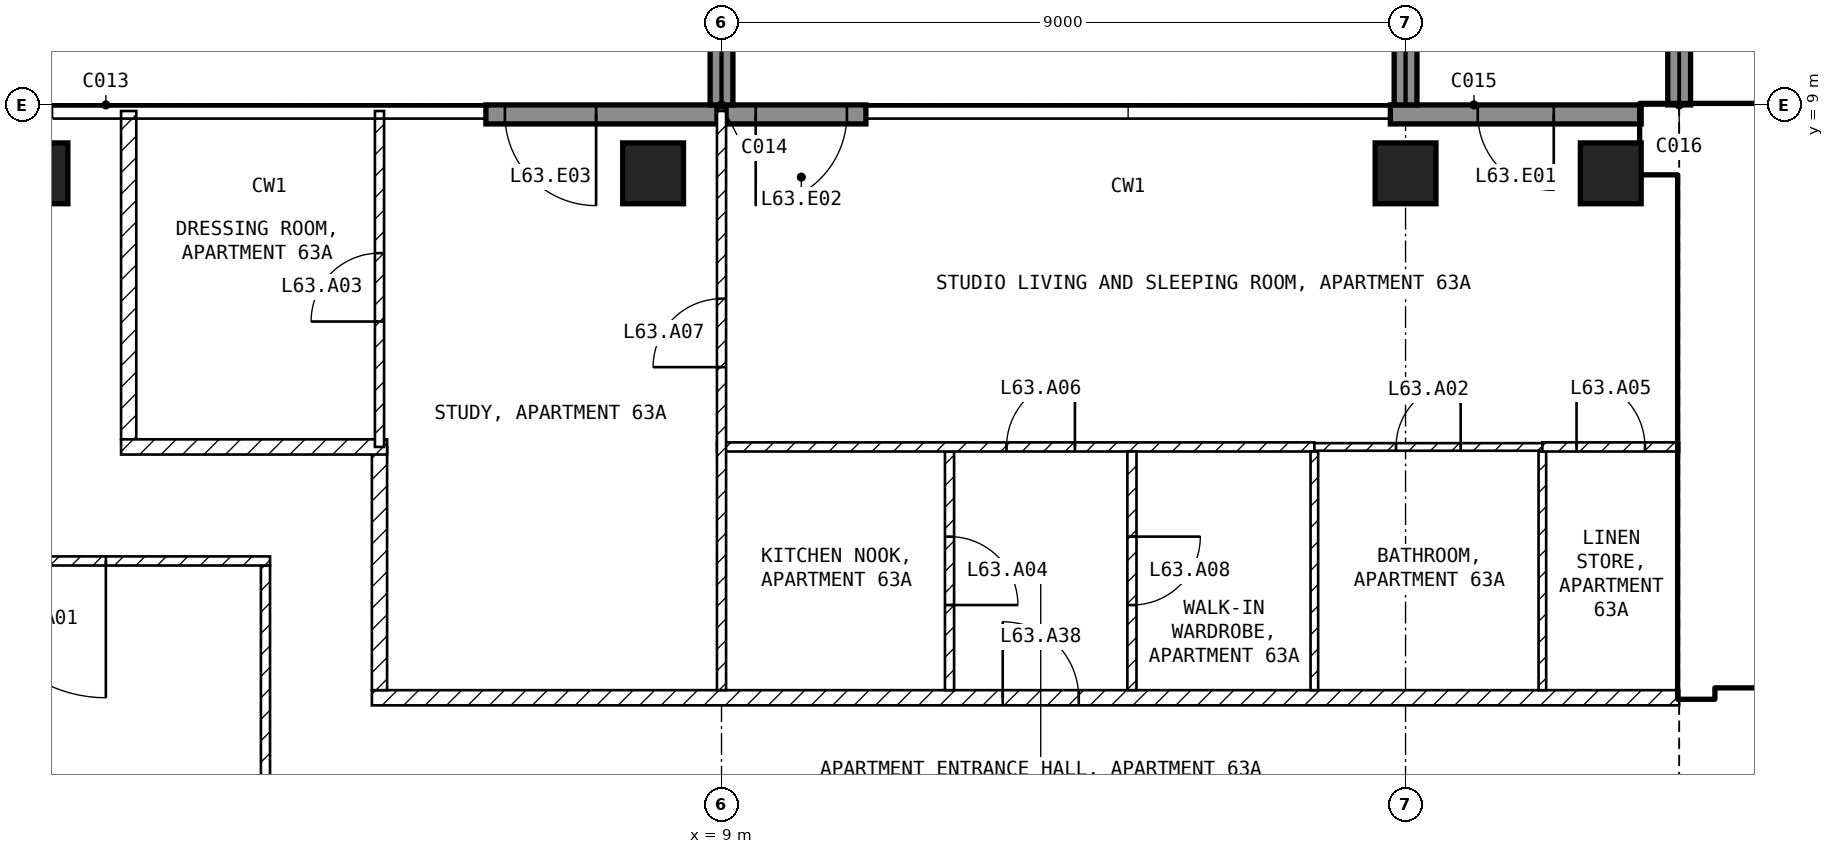
"""IFC4 building model, lengths in metres.
Left out: names, types, materials, properties, quantities, classifications, styles, units other than length and angle.
Written with IfcOpenShell. Run it as: python <this file> out.ifc"""

import sys

from ifc_helpers import new_model, si_unit, direction, frame, frame_2d, origin, origin_2d, place, context, subcontext, project, spatial, rectangle, extrude, element, fill, save


model = new_model("IFC4")
c1 = context("Model", 3, precision=1e-05, world=origin(), true_north=direction((0.0, 1.0)))
c2 = subcontext(c1, "Body", "Model", "MODEL_VIEW")
j1 = project(units=[si_unit("LENGTHUNIT", "METRE"), si_unit("PLANEANGLEUNIT", "RADIAN")], contexts=[c1])
p1 = place(None, origin())
s1 = spatial("IfcSite", under=j1, at=p1, CompositionType="ELEMENT")
p2 = place(p1, origin())
s2 = spatial("IfcBuilding", under=s1, at=p2, CompositionType="ELEMENT")
p3 = place(p2, frame((0.0, 0.0, 250.0)))
s3 = spatial("IfcBuildingStorey", under=s2, at=p3, CompositionType="ELEMENT", Elevation=250.0)
for number, where, z_axis, x_axis in (
    (1, (0.0, 8.1, -0.25), (0.0, 0.0, 1.0), (1.0, 0.0, 0.0)),
    (2, (8.1, 8.1, -0.25), (0.0, 0.0, 1.0), (1.0, 0.0, 0.0)),
    (3, (18.0, 8.1, -0.25), (0.0, 0.0, 1.0), (1.0, 0.0, 0.0)),
    (4, (20.7, 8.1, -0.25), (0.0, 0.0, 1.0), (1.0, 0.0, 0.0)),
):
    element("IfcColumn", number, at=place(p3, frame(where, z_axis=z_axis, x_axis=x_axis)), inside=s3, PredefinedType="COLUMN", context=c2, shape_type="SweptSolid", body=[
        extrude(rectangle(XDim=0.8, YDim=0.8, at=origin_2d()), origin(), (0.0, 0.0, 1.0), 3.5),
    ])
p4 = place(p3, frame((21.1, 8.875, 0.0), z_axis=(0.0, 0.0, 1.0), x_axis=(-1.0, 0.0, 0.0)))
e5 = element("IfcWall", 5, at=p4, inside=s3, PredefinedType="SOLIDWALL", context=c2, shape_type="SweptSolid", body=[
    extrude(rectangle(XDim=3.3, YDim=0.25, at=frame_2d((1.65, 0.0))), origin(), (0.0, 0.0, 1.0), 3.25),
])
p5 = place(p4, frame((1.15, 0.0, 0.0)))
e6 = element("IfcOpeningElement", 6, at=p5, cuts=e5, PredefinedType="OPENING", context=c2, shape_type="SweptSolid", body=[
    extrude(rectangle(XDim=1.0, YDim=2.4, at=frame_2d((0.5, 1.2))), frame((0.0, 0.135, 0.0), z_axis=(0.0, -1.0, 0.0), x_axis=(1.0, 0.0, 0.0)), (0.0, 0.0, 1.0), 0.27),
])
p6 = place(p3, frame((10.9, 8.875, 0.0), z_axis=(0.0, 0.0, 1.0), x_axis=(-1.0, 0.0, 0.0)))
e7 = element("IfcWall", 7, at=p6, inside=s3, PredefinedType="SOLIDWALL", context=c2, shape_type="SweptSolid", body=[
    extrude(rectangle(XDim=1.84, YDim=0.25, at=frame_2d((0.92, 0.0))), origin(), (0.0, 0.0, 1.0), 3.25),
])
p7 = place(p6, frame((0.25, 0.0, 0.0)))
e8 = element("IfcOpeningElement", 8, at=p7, cuts=e7, PredefinedType="OPENING", context=c2, shape_type="SweptSolid", body=[
    extrude(rectangle(XDim=1.2, YDim=2.4, at=frame_2d((0.6, 1.2))), frame((0.0, 0.135, 0.0), z_axis=(0.0, -1.0, 0.0), x_axis=(1.0, 0.0, 0.0)), (0.0, 0.0, 1.0), 0.27),
])
p8 = place(p3, frame((8.94, 8.875, 0.0), z_axis=(0.0, 0.0, 1.0), x_axis=(-1.0, 0.0, 0.0)))
e9 = element("IfcWall", 9, at=p8, inside=s3, PredefinedType="SOLIDWALL", context=c2, shape_type="SweptSolid", body=[
    extrude(rectangle(XDim=3.04, YDim=0.25, at=frame_2d((1.52, 0.0))), origin(), (0.0, 0.0, 1.0), 3.25),
])
p9 = place(p8, frame((1.59, 0.0, 0.0)))
e10 = element("IfcOpeningElement", 10, at=p9, cuts=e9, PredefinedType="OPENING", context=c2, shape_type="SweptSolid", body=[
    extrude(rectangle(XDim=1.2, YDim=2.4, at=frame_2d((0.6, 1.2))), frame((0.0, 0.135, 0.0), z_axis=(0.0, -1.0, 0.0), x_axis=(1.0, 0.0, 0.0)), (0.0, 0.0, 1.0), 0.27),
])
for number, where, z_axis, x_axis in (
    (11, (9.0, 9.0, 0.0), (0.0, 0.0, 1.0), (0.0, 1.0, 0.0)),
    (12, (18.0, 9.0, 0.0), (0.0, 0.0, 1.0), (0.0, 1.0, 0.0)),
    (13, (21.6, 9.0, 0.0), (0.0, 0.0, 1.0), (0.0, 1.0, 0.0)),
):
    element("IfcWall", number, at=place(p3, frame(where, z_axis=z_axis, x_axis=x_axis)), inside=s3, PredefinedType="SOLIDWALL", context=c2, shape_type="SweptSolid", body=[
        extrude(rectangle(XDim=2.7, YDim=0.3, at=frame_2d((1.35, 0.0))), origin(), (0.0, 0.0, 1.0), 3.25),
    ])
p10 = place(p3, frame((21.1, 8.55, 0.0), z_axis=(0.0, 0.0, 1.0), x_axis=(1.0, 0.0, 0.0)))
e14 = element("IfcWall", 14, at=p10, inside=s3, PredefinedType="SHEAR", context=c2, shape_type="SweptSolid", body=[
    extrude(rectangle(XDim=8.65, YDim=0.9, at=frame_2d((4.325, 0.0))), origin(), (0.0, 0.0, 1.0), 3.25),
])
p11 = place(p3, frame((21.825, 1.2, 0.0), z_axis=(0.0, 0.0, 1.0), x_axis=(0.0, 1.0, 0.0)))
e15 = element("IfcWall", 15, at=p11, inside=s3, PredefinedType="SHEAR", context=c2, shape_type="SweptSolid", body=[
    extrude(rectangle(XDim=6.9, YDim=0.45, at=frame_2d((3.45, 0.0))), origin(), (0.0, 0.0, 1.0), 3.25),
])
p12 = place(p3, frame((22.05, 1.45, 0.0), z_axis=(0.0, 0.0, 1.0), x_axis=(1.0, 0.0, 0.0)))
e16 = element("IfcWall", 16, at=p12, inside=s3, PredefinedType="SOLIDWALL", context=c2, shape_type="SweptSolid", body=[
    extrude(rectangle(XDim=11.3, YDim=0.2, at=frame_2d((5.65, 0.0))), origin(), (0.0, 0.0, 1.0), 3.25),
])
p13 = place(p12, frame((0.75, 0.0, 0.0)))
e17 = element("IfcOpeningElement", 17, at=p13, cuts=e16, PredefinedType="OPENING", context=c2, shape_type="SweptSolid", body=[
    extrude(rectangle(XDim=1.0, YDim=2.1, at=frame_2d((0.5, 1.05))), frame((0.0, 0.11, 0.0), z_axis=(0.0, -1.0, 0.0), x_axis=(1.0, 0.0, 0.0)), (0.0, 0.0, 1.0), 0.22),
])
p14 = place(p12, frame((3.25, 0.0, 0.0)))
e18 = element("IfcOpeningElement", 18, at=p14, cuts=e16, PredefinedType="OPENING", context=c2, shape_type="SweptSolid", body=[
    extrude(rectangle(XDim=1.0, YDim=2.1, at=frame_2d((0.5, 1.05))), frame((0.0, 0.11, 0.0), z_axis=(0.0, -1.0, 0.0), x_axis=(1.0, 0.0, 0.0)), (0.0, 0.0, 1.0), 0.22),
])
p15 = place(p12, frame((9.225, 0.0, 0.0)))
e19 = element("IfcOpeningElement", 19, at=p15, cuts=e16, PredefinedType="OPENING", context=c2, shape_type="SweptSolid", body=[
    extrude(rectangle(XDim=0.9, YDim=2.1, at=frame_2d((0.45, 1.05))), frame((0.0, 0.11, 0.0), z_axis=(0.0, -1.0, 0.0), x_axis=(1.0, 0.0, 0.0)), (0.0, 0.0, 1.0), 0.22),
])
p16 = place(p3, frame((22.05, 5.15, 0.0), z_axis=(0.0, 0.0, 1.0), x_axis=(1.0, 0.0, 0.0)))
e20 = element("IfcWall", 20, at=p16, inside=s3, PredefinedType="SOLIDWALL", context=c2, shape_type="SweptSolid", body=[
    extrude(rectangle(XDim=6.3, YDim=0.2, at=frame_2d((3.15, 0.0))), origin(), (0.0, 0.0, 1.0), 3.25),
])
p17 = place(p16, frame((0.2, 0.0, 0.0)))
e21 = element("IfcOpeningElement", 21, at=p17, cuts=e20, PredefinedType="OPENING", context=c2, shape_type="SweptSolid", body=[
    extrude(rectangle(XDim=1.0, YDim=2.1, at=frame_2d((0.5, 1.05))), frame((0.0, 0.11, 0.0), z_axis=(0.0, -1.0, 0.0), x_axis=(1.0, 0.0, 0.0)), (0.0, 0.0, 1.0), 0.22),
])
p18 = place(p3, frame((3.0, -2.94, 0.0), z_axis=(0.0, 0.0, 1.0), x_axis=(0.0, 1.0, 0.0)))
e22 = element("IfcWall", 22, at=p18, inside=s3, PredefinedType="PARTITIONING", context=c2, shape_type="SweptSolid", body=[
    extrude(rectangle(XDim=5.88, YDim=0.12, at=frame_2d((2.94, 0.0))), origin(), (0.0, 0.0, 1.0), 3.25),
])
p19 = place(p3, frame((3.06, 3.0, 0.0), z_axis=(0.0, 0.0, 1.0), x_axis=(-1.0, 0.0, 0.0)))
e23 = element("IfcWall", 23, at=p19, inside=s3, PredefinedType="PARTITIONING", context=c2, shape_type="SweptSolid", body=[
    extrude(rectangle(XDim=6.12, YDim=0.12, at=frame_2d((3.06, 0.0))), origin(), (0.0, 0.0, 1.0), 3.25),
])
p20 = place(p19, frame((2.16, 0.0, 0.0)))
e24 = element("IfcOpeningElement", 24, at=p20, cuts=e23, PredefinedType="OPENING", context=c2, shape_type="SweptSolid", body=[
    extrude(rectangle(XDim=1.8, YDim=2.1, at=frame_2d((0.9, 1.05))), frame((0.0, 0.07, 0.0), z_axis=(0.0, -1.0, 0.0), x_axis=(1.0, 0.0, 0.0)), (0.0, 0.0, 1.0), 0.14),
])
p21 = place(p3, frame((4.4, 1.2, 0.0), z_axis=(0.0, 0.0, 1.0), x_axis=(1.0, 0.0, 0.0)))
e25 = element("IfcWall", 25, at=p21, inside=s3, PredefinedType="PARTITIONING", context=c2, shape_type="SweptSolid", body=[
    extrude(rectangle(XDim=17.2, YDim=0.2, at=frame_2d((8.6, 0.0))), origin(), (0.0, 0.0, 1.0), 3.25),
])
p22 = place(p21, frame((8.3, 0.0, 0.0)))
e26 = element("IfcOpeningElement", 26, at=p22, cuts=e25, PredefinedType="OPENING", context=c2, shape_type="SweptSolid", body=[
    extrude(rectangle(XDim=1.0, YDim=2.1, at=frame_2d((0.5, 1.05))), frame((0.0, 0.11, 0.0), z_axis=(0.0, -1.0, 0.0), x_axis=(1.0, 0.0, 0.0)), (0.0, 0.0, 1.0), 0.22),
])
p23 = place(p3, frame((4.5, 4.5, 0.0), z_axis=(0.0, 0.0, 1.0), x_axis=(0.0, -1.0, 0.0)))
e27 = element("IfcWall", 27, at=p23, inside=s3, PredefinedType="PARTITIONING", context=c2, shape_type="SweptSolid", body=[
    extrude(rectangle(XDim=3.2, YDim=0.2, at=frame_2d((1.6, 0.0))), origin(), (0.0, 0.0, 1.0), 3.25),
])
p24 = place(p3, frame((1.2, 8.92, 0.0), z_axis=(0.0, 0.0, 1.0), x_axis=(0.0, -1.0, 0.0)))
e28 = element("IfcWall", 28, at=p24, inside=s3, PredefinedType="PARTITIONING", context=c2, shape_type="SweptSolid", body=[
    extrude(rectangle(XDim=4.32, YDim=0.2, at=frame_2d((2.16, 0.0))), origin(), (0.0, 0.0, 1.0), 3.25),
])
p25 = place(p3, frame((1.1, 4.5, 0.0), z_axis=(0.0, 0.0, 1.0), x_axis=(1.0, 0.0, 0.0)))
e29 = element("IfcWall", 29, at=p25, inside=s3, PredefinedType="PARTITIONING", context=c2, shape_type="SweptSolid", body=[
    extrude(rectangle(XDim=3.5, YDim=0.2, at=frame_2d((1.75, 0.0))), origin(), (0.0, 0.0, 1.0), 3.25),
])
p26 = place(p3, frame((12.0, 4.44, 0.0), z_axis=(0.0, 0.0, 1.0), x_axis=(0.0, -1.0, 0.0)))
e30 = element("IfcWall", 30, at=p26, inside=s3, PredefinedType="PARTITIONING", context=c2, shape_type="SweptSolid", body=[
    extrude(rectangle(XDim=3.14, YDim=0.12, at=frame_2d((1.57, 0.0))), origin(), (0.0, 0.0, 1.0), 3.25),
])
p27 = place(p26, frame((1.12, 0.0, 0.0)))
e31 = element("IfcOpeningElement", 31, at=p27, cuts=e30, PredefinedType="OPENING", context=c2, shape_type="SweptSolid", body=[
    extrude(rectangle(XDim=0.9, YDim=2.1, at=frame_2d((0.45, 1.05))), frame((0.0, 0.07, 0.0), z_axis=(0.0, -1.0, 0.0), x_axis=(1.0, 0.0, 0.0)), (0.0, 0.0, 1.0), 0.14),
])
p28 = place(p3, frame((8.94, 4.5, 0.0), z_axis=(0.0, 0.0, 1.0), x_axis=(1.0, 0.0, 0.0)))
e32 = element("IfcWall", 32, at=p28, inside=s3, PredefinedType="PARTITIONING", context=c2, shape_type="SweptSolid", body=[
    extrude(rectangle(XDim=7.86, YDim=0.12, at=frame_2d((3.93, 0.0))), origin(), (0.0, 0.0, 1.0), 3.25),
])
p29 = place(p28, frame((3.81, 0.0, 0.0)))
e33 = element("IfcOpeningElement", 33, at=p29, cuts=e32, PredefinedType="OPENING", context=c2, shape_type="SweptSolid", body=[
    extrude(rectangle(XDim=0.9, YDim=2.1, at=frame_2d((0.45, 1.05))), frame((0.0, 0.07, 0.0), z_axis=(0.0, -1.0, 0.0), x_axis=(1.0, 0.0, 0.0)), (0.0, 0.0, 1.0), 0.14),
])
p30 = place(p3, frame((9.0, 1.3, 0.0), z_axis=(0.0, 0.0, 1.0), x_axis=(0.0, 1.0, 0.0)))
e34 = element("IfcWall", 34, at=p30, inside=s3, PredefinedType="PARTITIONING", context=c2, shape_type="SweptSolid", body=[
    extrude(rectangle(XDim=7.62, YDim=0.12, at=frame_2d((3.81, 0.0))), origin(), (0.0, 0.0, 1.0), 3.25),
])
p31 = place(p30, frame((4.25, 0.0, 0.0)))
e35 = element("IfcOpeningElement", 35, at=p31, cuts=e34, PredefinedType="OPENING", context=c2, shape_type="SweptSolid", body=[
    extrude(rectangle(XDim=0.9, YDim=2.1, at=frame_2d((0.45, 1.05))), frame((0.0, 0.07, 0.0), z_axis=(0.0, -1.0, 0.0), x_axis=(1.0, 0.0, 0.0)), (0.0, 0.0, 1.0), 0.14),
])
p32 = place(p3, frame((14.4, 4.44, 0.0), z_axis=(0.0, 0.0, 1.0), x_axis=(0.0, -1.0, 0.0)))
e36 = element("IfcWall", 36, at=p32, inside=s3, PredefinedType="PARTITIONING", context=c2, shape_type="SweptSolid", body=[
    extrude(rectangle(XDim=3.14, YDim=0.12, at=frame_2d((1.57, 0.0))), origin(), (0.0, 0.0, 1.0), 3.25),
])
p33 = place(p32, frame((1.12, 0.0, 0.0)))
e37 = element("IfcOpeningElement", 37, at=p33, cuts=e36, PredefinedType="OPENING", context=c2, shape_type="SweptSolid", body=[
    extrude(rectangle(XDim=0.9, YDim=2.1, at=frame_2d((0.45, 1.05))), frame((0.0, 0.07, 0.0), z_axis=(0.0, -1.0, 0.0), x_axis=(1.0, 0.0, 0.0)), (0.0, 0.0, 1.0), 0.14),
])
for number, where, z_axis, x_axis in (
    (38, (16.8, 4.44, 0.0), (0.0, 0.0, 1.0), (0.0, -1.0, 0.0)),
    (39, (19.8, 4.44, 0.0), (0.0, 0.0, 1.0), (0.0, -1.0, 0.0)),
):
    element("IfcWall", number, at=place(p3, frame(where, z_axis=z_axis, x_axis=x_axis)), inside=s3, PredefinedType="PARTITIONING", context=c2, shape_type="SweptSolid", body=[
        extrude(rectangle(XDim=3.14, YDim=0.1, at=frame_2d((1.57, 0.0))), origin(), (0.0, 0.0, 1.0), 3.25),
    ])
p34 = place(p3, frame((16.8, 4.5, 0.0), z_axis=(0.0, 0.0, 1.0), x_axis=(1.0, 0.0, 0.0)))
e40 = element("IfcWall", 40, at=p34, inside=s3, PredefinedType="PARTITIONING", context=c2, shape_type="SweptSolid", body=[
    extrude(rectangle(XDim=3.0, YDim=0.1, at=frame_2d((1.5, 0.0))), origin(), (0.0, 0.0, 1.0), 3.25),
])
p35 = place(p34, frame((1.075, 0.0, 0.0)))
e41 = element("IfcOpeningElement", 41, at=p35, cuts=e40, PredefinedType="OPENING", context=c2, shape_type="SweptSolid", body=[
    extrude(rectangle(XDim=0.85, YDim=2.1, at=frame_2d((0.425, 1.05))), frame((0.0, 0.06, 0.0), z_axis=(0.0, -1.0, 0.0), x_axis=(1.0, 0.0, 0.0)), (0.0, 0.0, 1.0), 0.12),
])
p36 = place(p3, frame((19.8, 4.5, 0.0), z_axis=(0.0, 0.0, 1.0), x_axis=(1.0, 0.0, 0.0)))
e42 = element("IfcWall", 42, at=p36, inside=s3, PredefinedType="PARTITIONING", context=c2, shape_type="SweptSolid", body=[
    extrude(rectangle(XDim=1.8, YDim=0.12, at=frame_2d((0.9, 0.0))), origin(), (0.0, 0.0, 1.0), 3.25),
])
p37 = place(p36, frame((0.45, 0.0, 0.0)))
e43 = element("IfcOpeningElement", 43, at=p37, cuts=e42, PredefinedType="OPENING", context=c2, shape_type="SweptSolid", body=[
    extrude(rectangle(XDim=0.9, YDim=2.1, at=frame_2d((0.45, 1.05))), frame((0.0, 0.07, 0.0), z_axis=(0.0, -1.0, 0.0), x_axis=(1.0, 0.0, 0.0)), (0.0, 0.0, 1.0), 0.14),
])
p38 = place(p3, frame((4.5, 4.5, 0.0), z_axis=(0.0, 0.0, 1.0), x_axis=(0.0, 1.0, 0.0)))
e44 = element("IfcWall", 44, at=p38, inside=s3, PredefinedType="PARTITIONING", context=c2, shape_type="SweptSolid", body=[
    extrude(rectangle(XDim=4.42, YDim=0.12, at=frame_2d((2.21, 0.0))), origin(), (0.0, 0.0, 1.0), 3.25),
])
p39 = place(p38, frame((1.65, 0.0, 0.0)))
e45 = element("IfcOpeningElement", 45, at=p39, cuts=e44, PredefinedType="OPENING", context=c2, shape_type="SweptSolid", body=[
    extrude(rectangle(XDim=0.9, YDim=2.1, at=frame_2d((0.45, 1.05))), frame((0.0, 0.07, 0.0), z_axis=(0.0, -1.0, 0.0), x_axis=(1.0, 0.0, 0.0)), (0.0, 0.0, 1.0), 0.14),
])
p40 = place(p5, origin())
e46 = element("IfcDoor", 46, at=p40, inside=s3, OperationType="SINGLE_SWING_LEFT", PredefinedType="DOOR", context=c2, shape_type="SweptSolid", body=[
    extrude(rectangle(XDim=1.0, YDim=2.4, at=frame_2d((0.5, 1.2))), frame((0.0, 0.025, 0.0), z_axis=(0.0, -1.0, 0.0), x_axis=(1.0, 0.0, 0.0)), (0.0, 0.0, 1.0), 0.05),
])
fill(e6, e46)
p41 = place(p7, origin())
e47 = element("IfcDoor", 47, at=p41, inside=s3, OperationType="SINGLE_SWING_RIGHT", PredefinedType="DOOR", context=c2, shape_type="SweptSolid", body=[
    extrude(rectangle(XDim=1.2, YDim=2.4, at=frame_2d((0.6, 1.2))), frame((0.0, 0.025, 0.0), z_axis=(0.0, -1.0, 0.0), x_axis=(1.0, 0.0, 0.0)), (0.0, 0.0, 1.0), 0.05),
])
fill(e8, e47)
p42 = place(p9, origin())
e48 = element("IfcDoor", 48, at=p42, inside=s3, OperationType="SINGLE_SWING_LEFT", PredefinedType="DOOR", context=c2, shape_type="SweptSolid", body=[
    extrude(rectangle(XDim=1.2, YDim=2.4, at=frame_2d((0.6, 1.2))), frame((0.0, 0.025, 0.0), z_axis=(0.0, -1.0, 0.0), x_axis=(1.0, 0.0, 0.0)), (0.0, 0.0, 1.0), 0.05),
])
fill(e10, e48)
p43 = place(p17, origin())
e49 = element("IfcDoor", 49, at=p43, inside=s3, OperationType="SINGLE_SWING_LEFT", PredefinedType="DOOR", context=c2, shape_type="SweptSolid", body=[
    extrude(rectangle(XDim=1.0, YDim=2.1, at=frame_2d((0.5, 1.05))), frame((0.0, 0.025, 0.0), z_axis=(0.0, -1.0, 0.0), x_axis=(1.0, 0.0, 0.0)), (0.0, 0.0, 1.0), 0.05),
])
fill(e21, e49)
p44 = place(p20, origin())
e50 = element("IfcDoor", 50, at=p44, inside=s3, OperationType="SINGLE_SWING_LEFT", PredefinedType="DOOR", context=c2, shape_type="SweptSolid", body=[
    extrude(rectangle(XDim=1.8, YDim=2.1, at=frame_2d((0.9, 1.05))), frame((0.0, 0.025, 0.0), z_axis=(0.0, -1.0, 0.0), x_axis=(1.0, 0.0, 0.0)), (0.0, 0.0, 1.0), 0.05),
])
fill(e24, e50)
p45 = place(p35, origin())
e51 = element("IfcDoor", 51, at=p45, inside=s3, OperationType="SINGLE_SWING_RIGHT", PredefinedType="DOOR", context=c2, shape_type="SweptSolid", body=[
    extrude(rectangle(XDim=0.85, YDim=2.1, at=frame_2d((0.425, 1.05))), frame((0.0, 0.025, 0.0), z_axis=(0.0, -1.0, 0.0), x_axis=(1.0, 0.0, 0.0)), (0.0, 0.0, 1.0), 0.05),
])
fill(e41, e51)
p46 = place(p39, origin())
e52 = element("IfcDoor", 52, at=p46, inside=s3, OperationType="SINGLE_SWING_LEFT", PredefinedType="DOOR", context=c2, shape_type="SweptSolid", body=[
    extrude(rectangle(XDim=0.9, YDim=2.1, at=frame_2d((0.45, 1.05))), frame((0.0, 0.025, 0.0), z_axis=(0.0, -1.0, 0.0), x_axis=(1.0, 0.0, 0.0)), (0.0, 0.0, 1.0), 0.05),
])
fill(e45, e52)
p47 = place(p27, origin())
e53 = element("IfcDoor", 53, at=p47, inside=s3, OperationType="SINGLE_SWING_RIGHT", PredefinedType="DOOR", context=c2, shape_type="SweptSolid", body=[
    extrude(rectangle(XDim=0.9, YDim=2.1, at=frame_2d((0.45, 1.05))), frame((0.0, 0.025, 0.0), z_axis=(0.0, -1.0, 0.0), x_axis=(1.0, 0.0, 0.0)), (0.0, 0.0, 1.0), 0.05),
])
fill(e31, e53)
p48 = place(p37, origin())
e54 = element("IfcDoor", 54, at=p48, inside=s3, OperationType="SINGLE_SWING_LEFT", PredefinedType="DOOR", context=c2, shape_type="SweptSolid", body=[
    extrude(rectangle(XDim=0.9, YDim=2.1, at=frame_2d((0.45, 1.05))), frame((0.0, 0.025, 0.0), z_axis=(0.0, -1.0, 0.0), x_axis=(1.0, 0.0, 0.0)), (0.0, 0.0, 1.0), 0.05),
])
fill(e43, e54)
p49 = place(p29, origin())
e55 = element("IfcDoor", 55, at=p49, inside=s3, OperationType="SINGLE_SWING_RIGHT", PredefinedType="DOOR", context=c2, shape_type="SweptSolid", body=[
    extrude(rectangle(XDim=0.9, YDim=2.1, at=frame_2d((0.45, 1.05))), frame((0.0, 0.025, 0.0), z_axis=(0.0, -1.0, 0.0), x_axis=(1.0, 0.0, 0.0)), (0.0, 0.0, 1.0), 0.05),
])
fill(e33, e55)
p50 = place(p31, origin())
e56 = element("IfcDoor", 56, at=p50, inside=s3, OperationType="SINGLE_SWING_LEFT", PredefinedType="DOOR", context=c2, shape_type="SweptSolid", body=[
    extrude(rectangle(XDim=0.9, YDim=2.1, at=frame_2d((0.45, 1.05))), frame((0.0, 0.025, 0.0), z_axis=(0.0, -1.0, 0.0), x_axis=(1.0, 0.0, 0.0)), (0.0, 0.0, 1.0), 0.05),
])
fill(e35, e56)
p51 = place(p33, origin())
e57 = element("IfcDoor", 57, at=p51, inside=s3, OperationType="SINGLE_SWING_LEFT", PredefinedType="DOOR", context=c2, shape_type="SweptSolid", body=[
    extrude(rectangle(XDim=0.9, YDim=2.1, at=frame_2d((0.45, 1.05))), frame((0.0, 0.025, 0.0), z_axis=(0.0, -1.0, 0.0), x_axis=(1.0, 0.0, 0.0)), (0.0, 0.0, 1.0), 0.05),
])
fill(e37, e57)
p52 = place(p22, origin())
e58 = element("IfcDoor", 58, at=p52, inside=s3, OperationType="SINGLE_SWING_LEFT", PredefinedType="DOOR", context=c2, shape_type="SweptSolid", body=[
    extrude(rectangle(XDim=1.0, YDim=2.1, at=frame_2d((0.5, 1.05))), frame((0.0, 0.025, 0.0), z_axis=(0.0, -1.0, 0.0), x_axis=(1.0, 0.0, 0.0)), (0.0, 0.0, 1.0), 0.05),
])
fill(e26, e58)
save(model, sys.argv[1])
